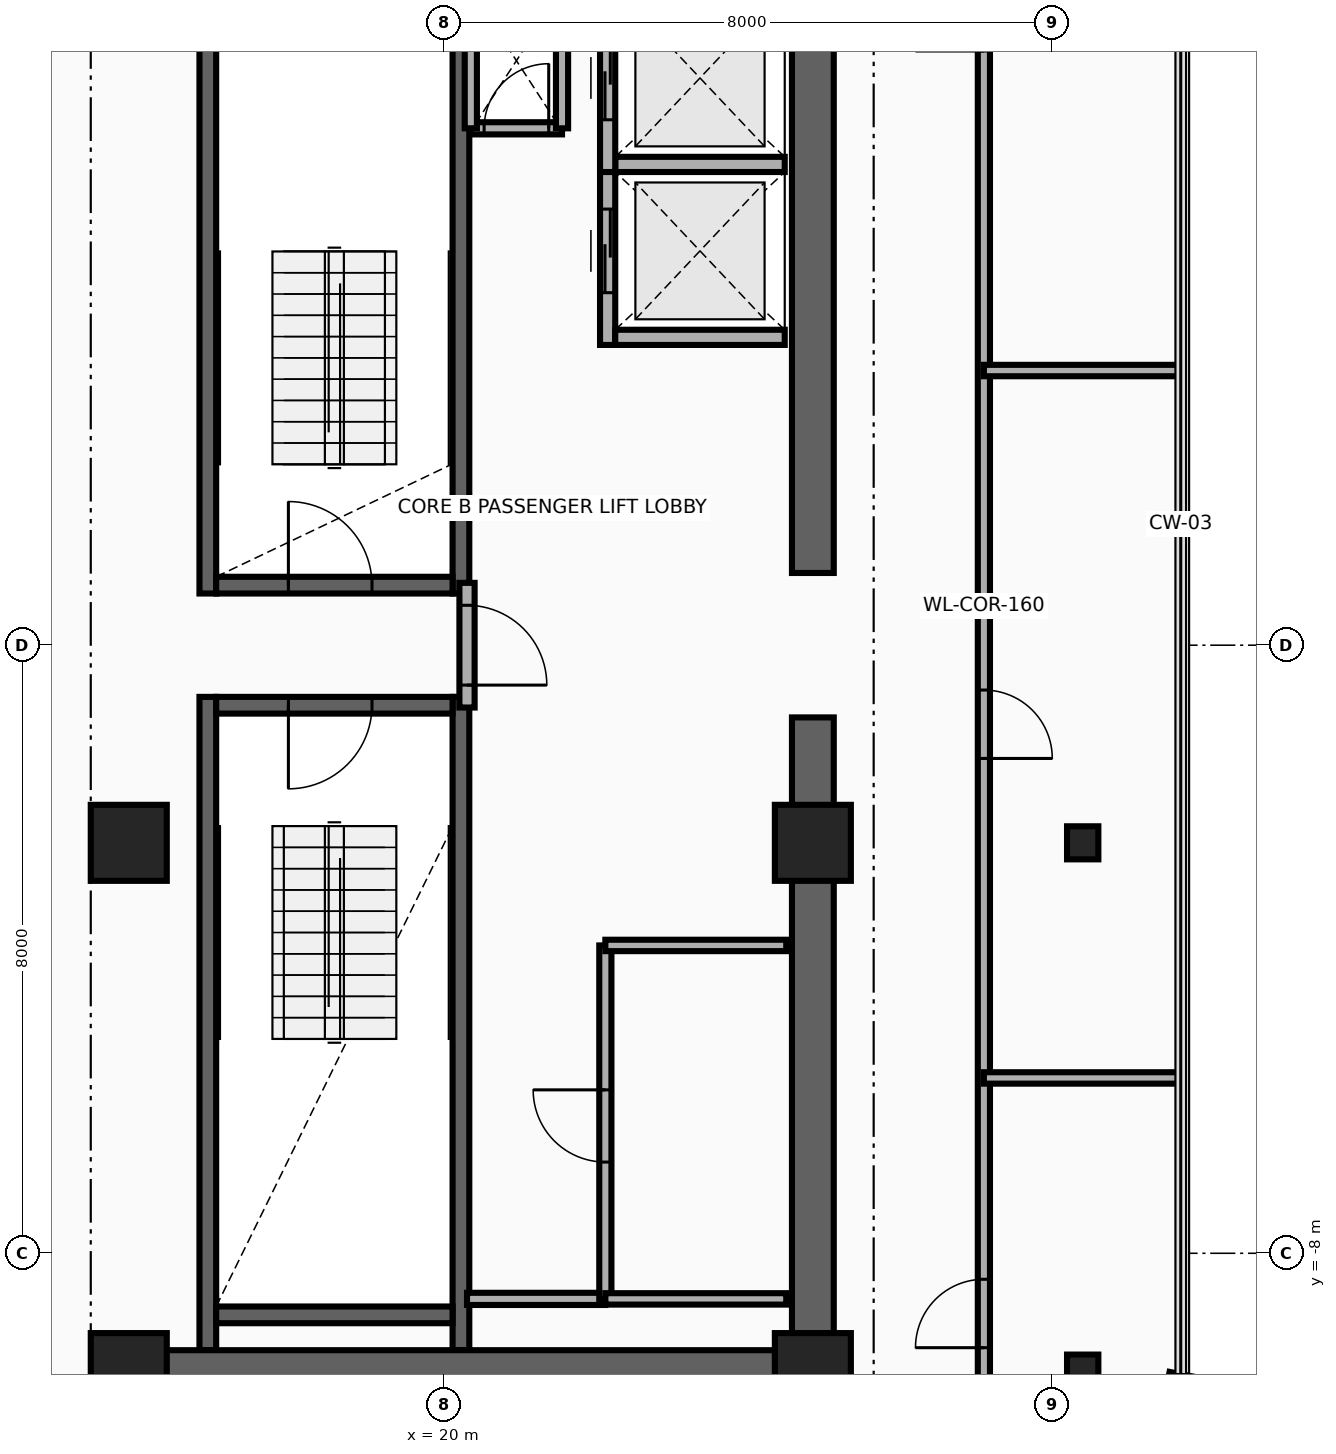
"""IFC4 building model, lengths in metres.
Left out: names, types, materials, properties, quantities, classifications, styles, units other than length and angle.
Written with IfcOpenShell. Run it as: python <this file> out.ifc"""

import sys

from ifc_helpers import new_model, si_unit, direction, frame, frame_2d, origin, origin_2d, place, context, subcontext, project, spatial, rectangle, i_section, extrude, source, transform, mapped, element, fill, save


model = new_model("IFC4")
c1 = context("Model", 3, precision=1e-05, world=origin(), true_north=direction((0.0, 1.0)))
c2 = subcontext(c1, "Body", "Model", "MODEL_VIEW")
j1 = project(units=[si_unit("LENGTHUNIT", "METRE"), si_unit("PLANEANGLEUNIT", "RADIAN")], contexts=[c1])
p1 = place(None, origin())
s1 = spatial("IfcSite", under=j1, at=p1, CompositionType="ELEMENT")
p2 = place(p1, origin())
s2 = spatial("IfcBuilding", under=s1, at=p2, CompositionType="ELEMENT")
p3 = place(p2, frame((0.0, 0.0, 188.4)))
s3 = spatial("IfcBuildingStorey", under=s2, at=p3, CompositionType="ELEMENT", Elevation=188.4)
for number, where, z_axis, x_axis in (
    (1, (16.89, 0.68, 0.0), (0.0, 0.0, 1.0), (0.0, 1.0, 0.0)),
    (2, (20.22, 0.68, 0.0), (0.0, 0.0, 1.0), (0.0, 1.0, 0.0)),
):
    element("IfcWall", number, at=place(p3, frame(where, z_axis=z_axis, x_axis=x_axis)), inside=s3, PredefinedType="SHEAR", context=c2, shape_type="SweptSolid", body=[
        extrude(rectangle(XDim=8.595, YDim=0.22, at=frame_2d((4.297, 0.0))), origin(), (0.0, 0.0, 1.0), 3.63),
    ])
p4 = place(p3, frame((17.0, 0.79, 0.0), z_axis=(0.0, 0.0, 1.0), x_axis=(1.0, 0.0, 0.0)))
e3 = element("IfcWall", 3, at=p4, inside=s3, PredefinedType="SHEAR", context=c2, shape_type="SweptSolid", body=[
    extrude(rectangle(XDim=3.11, YDim=0.22, at=frame_2d((1.555, 0.0))), origin(), (0.0, 0.0, 1.0), 3.63),
])
p5 = place(p4, frame((0.95, 0.0, 0.0)))
e4 = element("IfcOpeningElement", 4, at=p5, cuts=e3, PredefinedType="OPENING", context=c2, shape_type="SweptSolid", body=[
    extrude(rectangle(XDim=1.1, YDim=2.15, at=frame_2d((0.55, 1.075))), frame((0.0, 0.125, 0.0), z_axis=(0.0, -1.0, 0.0), x_axis=(1.0, 0.0, 0.0)), (0.0, 0.0, 1.0), 0.25),
])
for number, where, z_axis, x_axis in (
    (5, (16.89, -9.275, 0.0), (0.0, 0.0, 1.0), (0.0, 1.0, 0.0)),
    (6, (20.22, -9.275, 0.0), (0.0, 0.0, 1.0), (0.0, 1.0, 0.0)),
):
    element("IfcWall", number, at=place(p3, frame(where, z_axis=z_axis, x_axis=x_axis)), inside=s3, PredefinedType="SHEAR", context=c2, shape_type="SweptSolid", body=[
        extrude(rectangle(XDim=8.595, YDim=0.22, at=frame_2d((4.297, 0.0))), origin(), (0.0, 0.0, 1.0), 3.63),
    ])
p6 = place(p3, frame((17.0, -8.81, 0.0), z_axis=(0.0, 0.0, 1.0), x_axis=(1.0, 0.0, 0.0)))
e7 = element("IfcWall", 7, at=p6, inside=s3, PredefinedType="SHEAR", context=c2, shape_type="SweptSolid", body=[
    extrude(rectangle(XDim=3.11, YDim=0.22, at=frame_2d((1.555, 0.0))), origin(), (0.0, 0.0, 1.0), 3.63),
])
p7 = place(p3, frame((17.0, -0.79, 0.0), z_axis=(0.0, 0.0, 1.0), x_axis=(1.0, 0.0, 0.0)))
e8 = element("IfcWall", 8, at=p7, inside=s3, PredefinedType="SHEAR", context=c2, shape_type="SweptSolid", body=[
    extrude(rectangle(XDim=3.11, YDim=0.22, at=frame_2d((1.555, 0.0))), origin(), (0.0, 0.0, 1.0), 3.63),
])
p8 = place(p7, frame((0.95, 0.0, 0.0)))
e9 = element("IfcOpeningElement", 9, at=p8, cuts=e8, PredefinedType="OPENING", context=c2, shape_type="SweptSolid", body=[
    extrude(rectangle(XDim=1.1, YDim=2.15, at=frame_2d((0.55, 1.075))), frame((0.0, 0.125, 0.0), z_axis=(0.0, -1.0, 0.0), x_axis=(1.0, 0.0, 0.0)), (0.0, 0.0, 1.0), 0.25),
])
for number, where, z_axis, x_axis in (
    (10, (24.85, -9.825, 0.0), (0.0, 0.0, 1.0), (0.0, 1.0, 0.0)),
    (11, (24.85, 0.95, 0.0), (0.0, 0.0, 1.0), (0.0, 1.0, 0.0)),
):
    element("IfcWall", number, at=place(p3, frame(where, z_axis=z_axis, x_axis=x_axis)), inside=s3, PredefinedType="SHEAR", context=c2, shape_type="SweptSolid", body=[
        extrude(rectangle(XDim=8.875, YDim=0.55, at=frame_2d((4.438, 0.0))), origin(), (0.0, 0.0, 1.0), 3.63),
    ])
p9 = place(p3, frame((15.85, -9.55, 0.0), z_axis=(0.0, 0.0, 1.0), x_axis=(1.0, 0.0, 0.0)))
e12 = element("IfcWall", 12, at=p9, inside=s3, PredefinedType="SHEAR", context=c2, shape_type="SweptSolid", body=[
    extrude(rectangle(XDim=9.0, YDim=0.55, at=frame_2d((4.5, 0.0))), origin(), (0.0, 0.0, 1.0), 3.63),
])
m1 = source(origin(), c2, "Body", "SweptSolid", [
    extrude(rectangle(XDim=1.0, YDim=1.0, at=origin_2d()), origin(), (0.0, 0.0, 1.0), 3.95),
])
for number, where, z_axis, x_axis in (
    (13, (15.85, -9.55, 0.0), (0.0, 0.0, 1.0), (1.0, 0.0, 0.0)),
    (14, (24.85, -9.55, 0.0), (0.0, 0.0, 1.0), (1.0, 0.0, 0.0)),
):
    element("IfcColumn", number, at=place(p3, frame(where, z_axis=z_axis, x_axis=x_axis)), inside=s3, PredefinedType="COLUMN", context=c2, shape_type="MappedRepresentation", body=[
        mapped(m1, transform((0.0, 0.0, 0.0), x_axis=(1.0, 0.0, 0.0), y_axis=(0.0, 1.0, 0.0), z_axis=(0.0, 0.0, 1.0), scale=1.0)),
    ])
m2 = source(origin(), c2, "Body", "SweptSolid", [
    extrude(i_section(OverallWidth=0.412, OverallDepth=0.435, WebThickness=0.036, FlangeThickness=0.057, at=origin_2d()), origin(), (0.0, 0.0, 1.0), 3.95),
])
p10 = place(p3, frame((28.4, -9.55, 0.0), z_axis=(0.0, 0.0, 1.0), x_axis=(1.0, 0.0, 0.0)))
e15 = element("IfcColumn", 15, at=p10, inside=s3, PredefinedType="COLUMN", context=c2, shape_type="MappedRepresentation", body=[
    mapped(m2, transform((0.0, 0.0, 0.0), x_axis=(1.0, 0.0, 0.0), y_axis=(0.0, 1.0, 0.0), z_axis=(0.0, 0.0, 1.0), scale=1.0)),
])
for number, where, z_axis, x_axis in (
    (16, (15.85, -2.6, 0.0), (0.0, 0.0, 1.0), (1.0, 0.0, 0.0)),
    (17, (24.85, -2.6, 0.0), (0.0, 0.0, 1.0), (1.0, 0.0, 0.0)),
):
    element("IfcColumn", number, at=place(p3, frame(where, z_axis=z_axis, x_axis=x_axis)), inside=s3, PredefinedType="COLUMN", context=c2, shape_type="MappedRepresentation", body=[
        mapped(m1, transform((0.0, 0.0, 0.0), x_axis=(1.0, 0.0, 0.0), y_axis=(0.0, 1.0, 0.0), z_axis=(0.0, 0.0, 1.0), scale=1.0)),
    ])
p11 = place(p3, frame((28.4, -2.6, 0.0), z_axis=(0.0, 0.0, 1.0), x_axis=(1.0, 0.0, 0.0)))
e18 = element("IfcColumn", 18, at=p11, inside=s3, PredefinedType="COLUMN", context=c2, shape_type="MappedRepresentation", body=[
    mapped(m2, transform((0.0, 0.0, 0.0), x_axis=(1.0, 0.0, 0.0), y_axis=(0.0, 1.0, 0.0), z_axis=(0.0, 0.0, 1.0), scale=1.0)),
])
p12 = place(p3, frame((29.69, -9.589, 0.0), z_axis=(0.0, 0.0, 1.0), x_axis=(-0.195025152871, -0.980798241101, 0.0)))
e19 = element("IfcWall", 19, at=p12, inside=s3, PredefinedType="SOLIDWALL", context=c2, shape_type="SweptSolid", body=[
    extrude(rectangle(XDim=0.904, YDim=0.3, at=frame_2d((0.452, 0.0))), origin(), (0.0, 0.0, 1.0), 3.63),
])
p13 = place(p3, frame((22.15, 3.95, 0.0), z_axis=(0.0, 0.0, 1.0), x_axis=(0.0, 1.0, 0.0)))
e20 = element("IfcWall", 20, at=p13, inside=s3, PredefinedType="MOVABLE", context=c2, shape_type="SweptSolid", body=[
    extrude(rectangle(XDim=2.475, YDim=0.2, at=frame_2d((1.238, 0.0))), origin(), (0.0, 0.0, 1.0), 3.63),
])
p14 = place(p13, frame((0.688, 0.0, 0.0)))
e21 = element("IfcOpeningElement", 21, at=p14, cuts=e20, PredefinedType="OPENING", context=c2, shape_type="SweptSolid", body=[
    extrude(rectangle(XDim=1.1, YDim=2.1, at=frame_2d((0.55, 1.05))), frame((0.0, 0.115, 0.0), z_axis=(0.0, -1.0, 0.0), x_axis=(1.0, 0.0, 0.0)), (0.0, 0.0, 1.0), 0.23),
])
for number, where, z_axis, x_axis in (
    (22, (22.25, 4.05, 0.0), (0.0, 0.0, 1.0), (1.0, 0.0, 0.0)),
    (23, (22.25, 6.325, 0.0), (0.0, 0.0, 1.0), (1.0, 0.0, 0.0)),
):
    element("IfcWall", number, at=place(p3, frame(where, z_axis=z_axis, x_axis=x_axis)), inside=s3, PredefinedType="MOVABLE", context=c2, shape_type="SweptSolid", body=[
        extrude(rectangle(XDim=2.23, YDim=0.2, at=frame_2d((1.115, 0.0))), origin(), (0.0, 0.0, 1.0), 3.63),
    ])
p15 = place(p3, frame((22.15, 6.225, 0.0), z_axis=(0.0, 0.0, 1.0), x_axis=(0.0, 1.0, 0.0)))
e24 = element("IfcWall", 24, at=p15, inside=s3, PredefinedType="MOVABLE", context=c2, shape_type="SweptSolid", body=[
    extrude(rectangle(XDim=2.475, YDim=0.2, at=frame_2d((1.237, 0.0))), origin(), (0.0, 0.0, 1.0), 3.63),
])
p16 = place(p15, frame((0.688, 0.0, 0.0)))
e25 = element("IfcOpeningElement", 25, at=p16, cuts=e24, PredefinedType="OPENING", context=c2, shape_type="SweptSolid", body=[
    extrude(rectangle(XDim=1.1, YDim=2.1, at=frame_2d((0.55, 1.05))), frame((0.0, 0.115, 0.0), z_axis=(0.0, -1.0, 0.0), x_axis=(1.0, 0.0, 0.0)), (0.0, 0.0, 1.0), 0.23),
])
p17 = place(p3, frame((20.3, -0.82, 0.0), z_axis=(0.0, 0.0, 1.0), x_axis=(0.0, 1.0, 0.0)))
e26 = element("IfcWall", 26, at=p17, inside=s3, PredefinedType="PARTITIONING", context=c2, shape_type="SweptSolid", body=[
    extrude(rectangle(XDim=1.64, YDim=0.2, at=frame_2d((0.82, 0.0))), origin(), (0.0, 0.0, 1.0), 3.63),
])
p18 = place(p17, frame((0.295, 0.0, 0.0)))
e27 = element("IfcOpeningElement", 27, at=p18, cuts=e26, PredefinedType="OPENING", context=c2, shape_type="SweptSolid", body=[
    extrude(rectangle(XDim=1.05, YDim=2.15, at=frame_2d((0.525, 1.075))), frame((0.0, 0.115, 0.0), z_axis=(0.0, -1.0, 0.0), x_axis=(1.0, 0.0, 0.0)), (0.0, 0.0, 1.0), 0.23),
])
p19 = place(p3, frame((20.35, 6.8, 0.0), z_axis=(0.0, 0.0, 1.0), x_axis=(1.0, 0.0, 0.0)))
e28 = element("IfcWall", 28, at=p19, inside=s3, PredefinedType="PARTITIONING", context=c2, shape_type="SweptSolid", body=[
    extrude(rectangle(XDim=1.2, YDim=0.16, at=frame_2d((0.6, 0.0))), origin(), (0.0, 0.0, 1.0), 3.63),
])
p20 = place(p19, frame((0.175, 0.0, 0.0)))
e29 = element("IfcOpeningElement", 29, at=p20, cuts=e28, PredefinedType="OPENING", context=c2, shape_type="SweptSolid", body=[
    extrude(rectangle(XDim=0.85, YDim=2.05, at=frame_2d((0.425, 1.025))), frame((0.0, 0.095, 0.0), z_axis=(0.0, -1.0, 0.0), x_axis=(1.0, 0.0, 0.0)), (0.0, 0.0, 1.0), 0.19),
])
for number, where, z_axis, x_axis in (
    (30, (21.55, 6.8, 0.0), (0.0, 0.0, 1.0), (0.0, 1.0, 0.0)),
    (31, (20.35, 6.8, 0.0), (0.0, 0.0, 1.0), (0.0, 1.0, 0.0)),
):
    element("IfcWall", number, at=place(p3, frame(where, z_axis=z_axis, x_axis=x_axis)), inside=s3, PredefinedType="PARTITIONING", context=c2, shape_type="SweptSolid", body=[
        extrude(rectangle(XDim=1.8, YDim=0.16, at=frame_2d((0.9, 0.0))), origin(), (0.0, 0.0, 1.0), 3.63),
    ])
p21 = place(p3, frame((20.3, -8.6, 0.0), z_axis=(0.0, 0.0, 1.0), x_axis=(1.0, 0.0, 0.0)))
e32 = element("IfcWall", 32, at=p21, inside=s3, PredefinedType="PARTITIONING", context=c2, shape_type="SweptSolid", body=[
    extrude(rectangle(XDim=1.82, YDim=0.16, at=frame_2d((0.91, 0.0))), origin(), (0.0, 0.0, 1.0), 3.63),
])
p22 = place(p3, frame((22.12, -8.6, 0.0), z_axis=(0.0, 0.0, 1.0), x_axis=(0.0, 1.0, 0.0)))
e33 = element("IfcWall", 33, at=p22, inside=s3, PredefinedType="PARTITIONING", context=c2, shape_type="SweptSolid", body=[
    extrude(rectangle(XDim=4.65, YDim=0.16, at=frame_2d((2.325, 0.0))), origin(), (0.0, 0.0, 1.0), 3.63),
])
p23 = place(p22, frame((1.8, 0.0, 0.0)))
e34 = element("IfcOpeningElement", 34, at=p23, cuts=e33, PredefinedType="OPENING", context=c2, shape_type="SweptSolid", body=[
    extrude(rectangle(XDim=0.95, YDim=2.15, at=frame_2d((0.475, 1.075))), frame((0.0, 0.095, 0.0), z_axis=(0.0, -1.0, 0.0), x_axis=(1.0, 0.0, 0.0)), (0.0, 0.0, 1.0), 0.19),
])
for number, where, z_axis, x_axis in (
    (35, (22.12, -3.95, 0.0), (0.0, 0.0, 1.0), (1.0, 0.0, 0.0)),
    (36, (22.12, -8.6, 0.0), (0.0, 0.0, 1.0), (1.0, 0.0, 0.0)),
):
    element("IfcWall", number, at=place(p3, frame(where, z_axis=z_axis, x_axis=x_axis)), inside=s3, PredefinedType="PARTITIONING", context=c2, shape_type="SweptSolid", body=[
        extrude(rectangle(XDim=2.38, YDim=0.15, at=frame_2d((1.19, 0.0))), origin(), (0.0, 0.0, 1.0), 3.63),
    ])
p24 = place(p3, frame((27.1, -11.89, 0.0), z_axis=(0.0, 0.0, 1.0), x_axis=(0.0, 1.0, 0.0)))
e37 = element("IfcWall", 37, at=p24, inside=s3, PredefinedType="PARTITIONING", context=c2, shape_type="SweptSolid", body=[
    extrude(rectangle(XDim=24.81, YDim=0.16, at=frame_2d((12.405, 0.0))), origin(), (0.0, 0.0, 1.0), 2.665),
])
p25 = place(p24, frame((2.648, 0.0, 0.0)))
e38 = element("IfcOpeningElement", 38, at=p25, cuts=e37, PredefinedType="OPENING", context=c2, shape_type="SweptSolid", body=[
    extrude(rectangle(XDim=0.9, YDim=2.1, at=frame_2d((0.45, 1.05))), frame((0.0, 0.095, 0.0), z_axis=(0.0, -1.0, 0.0), x_axis=(1.0, 0.0, 0.0)), (0.0, 0.0, 1.0), 0.19),
])
p26 = place(p24, frame((10.4, 0.0, 0.0)))
e39 = element("IfcOpeningElement", 39, at=p26, cuts=e37, PredefinedType="OPENING", context=c2, shape_type="SweptSolid", body=[
    extrude(rectangle(XDim=0.9, YDim=2.1, at=frame_2d((0.45, 1.05))), frame((0.0, 0.095, 0.0), z_axis=(0.0, -1.0, 0.0), x_axis=(1.0, 0.0, 0.0)), (0.0, 0.0, 1.0), 0.19),
])
p27 = place(p24, frame((19.707, 0.0, 0.0)))
e40 = element("IfcOpeningElement", 40, at=p27, cuts=e37, PredefinedType="OPENING", context=c2, shape_type="SweptSolid", body=[
    extrude(rectangle(XDim=0.9, YDim=2.1, at=frame_2d((0.45, 1.05))), frame((0.0, 0.095, 0.0), z_axis=(0.0, -1.0, 0.0), x_axis=(1.0, 0.0, 0.0)), (0.0, 0.0, 1.0), 0.19),
])
for number, where, z_axis, x_axis in (
    (41, (27.1, -5.693, 0.0), (0.0, 0.0, 1.0), (1.0, 0.0, 0.0)),
    (42, (27.1, 3.613, 0.0), (0.0, 0.0, 1.0), (1.0, 0.0, 0.0)),
):
    element("IfcWall", number, at=place(p3, frame(where, z_axis=z_axis, x_axis=x_axis)), inside=s3, PredefinedType="PARTITIONING", context=c2, shape_type="SweptSolid", body=[
        extrude(rectangle(XDim=2.59, YDim=0.15, at=frame_2d((1.295, 0.0))), origin(), (0.0, 0.0, 1.0), 3.076),
    ])
p28 = place(p14, origin())
e43 = element("IfcDoor", 43, at=p28, inside=s3, OperationType="DOUBLE_DOOR_SLIDING", PredefinedType="DOOR", context=c2, shape_type="SweptSolid", body=[
    extrude(rectangle(XDim=1.1, YDim=2.1, at=frame_2d((0.55, 1.05))), frame((0.0, 0.025, 0.0), z_axis=(0.0, -1.0, 0.0), x_axis=(1.0, 0.0, 0.0)), (0.0, 0.0, 1.0), 0.05),
])
fill(e21, e43)
p29 = place(p16, origin())
e44 = element("IfcDoor", 44, at=p29, inside=s3, OperationType="DOUBLE_DOOR_SLIDING", PredefinedType="DOOR", context=c2, shape_type="SweptSolid", body=[
    extrude(rectangle(XDim=1.1, YDim=2.1, at=frame_2d((0.55, 1.05))), frame((0.0, 0.025, 0.0), z_axis=(0.0, -1.0, 0.0), x_axis=(1.0, 0.0, 0.0)), (0.0, 0.0, 1.0), 0.05),
])
fill(e25, e44)
p30 = place(p18, frame((1.05, 0.0, 0.0), z_axis=(0.0, 0.0, 1.0), x_axis=(-1.0, 0.0, 0.0)))
e45 = element("IfcDoor", 45, at=p30, inside=s3, OperationType="SINGLE_SWING_LEFT", PredefinedType="DOOR", context=c2, shape_type="SweptSolid", body=[
    extrude(rectangle(XDim=1.05, YDim=2.15, at=frame_2d((0.525, 1.075))), frame((0.0, 0.025, 0.0), z_axis=(0.0, -1.0, 0.0), x_axis=(1.0, 0.0, 0.0)), (0.0, 0.0, 1.0), 0.05),
])
fill(e27, e45)
p31 = place(p5, origin())
e46 = element("IfcDoor", 46, at=p31, inside=s3, OperationType="SINGLE_SWING_RIGHT", PredefinedType="DOOR", context=c2, shape_type="SweptSolid", body=[
    extrude(rectangle(XDim=1.1, YDim=2.15, at=frame_2d((0.55, 1.075))), frame((0.0, 0.025, 0.0), z_axis=(0.0, -1.0, 0.0), x_axis=(1.0, 0.0, 0.0)), (0.0, 0.0, 1.0), 0.05),
])
fill(e4, e46)
p32 = place(p8, frame((1.1, 0.0, 0.0), z_axis=(0.0, 0.0, 1.0), x_axis=(-1.0, 0.0, 0.0)))
e47 = element("IfcDoor", 47, at=p32, inside=s3, OperationType="SINGLE_SWING_LEFT", PredefinedType="DOOR", context=c2, shape_type="SweptSolid", body=[
    extrude(rectangle(XDim=1.1, YDim=2.15, at=frame_2d((0.55, 1.075))), frame((0.0, 0.025, 0.0), z_axis=(0.0, -1.0, 0.0), x_axis=(1.0, 0.0, 0.0)), (0.0, 0.0, 1.0), 0.05),
])
fill(e9, e47)
p33 = place(p20, origin())
e48 = element("IfcDoor", 48, at=p33, inside=s3, OperationType="SINGLE_SWING_RIGHT", PredefinedType="DOOR", context=c2, shape_type="SweptSolid", body=[
    extrude(rectangle(XDim=0.85, YDim=2.05, at=frame_2d((0.425, 1.025))), frame((0.0, 0.025, 0.0), z_axis=(0.0, -1.0, 0.0), x_axis=(1.0, 0.0, 0.0)), (0.0, 0.0, 1.0), 0.05),
])
fill(e29, e48)
p34 = place(p23, origin())
e49 = element("IfcDoor", 49, at=p34, inside=s3, OperationType="SINGLE_SWING_LEFT", PredefinedType="DOOR", context=c2, shape_type="SweptSolid", body=[
    extrude(rectangle(XDim=0.95, YDim=2.15, at=frame_2d((0.475, 1.075))), frame((0.0, 0.025, 0.0), z_axis=(0.0, -1.0, 0.0), x_axis=(1.0, 0.0, 0.0)), (0.0, 0.0, 1.0), 0.05),
])
fill(e34, e49)
p35 = place(p25, origin())
e50 = element("IfcDoor", 50, at=p35, inside=s3, OperationType="SINGLE_SWING_RIGHT", PredefinedType="DOOR", context=c2, shape_type="SweptSolid", body=[
    extrude(rectangle(XDim=0.9, YDim=2.1, at=frame_2d((0.45, 1.05))), frame((0.0, 0.025, 0.0), z_axis=(0.0, -1.0, 0.0), x_axis=(1.0, 0.0, 0.0)), (0.0, 0.0, 1.0), 0.05),
])
fill(e38, e50)
p36 = place(p26, frame((0.9, 0.0, 0.0), z_axis=(0.0, 0.0, 1.0), x_axis=(-1.0, 0.0, 0.0)))
e51 = element("IfcDoor", 51, at=p36, inside=s3, OperationType="SINGLE_SWING_LEFT", PredefinedType="DOOR", context=c2, shape_type="SweptSolid", body=[
    extrude(rectangle(XDim=0.9, YDim=2.1, at=frame_2d((0.45, 1.05))), frame((0.0, 0.025, 0.0), z_axis=(0.0, -1.0, 0.0), x_axis=(1.0, 0.0, 0.0)), (0.0, 0.0, 1.0), 0.05),
])
fill(e39, e51)
save(model, sys.argv[1])
